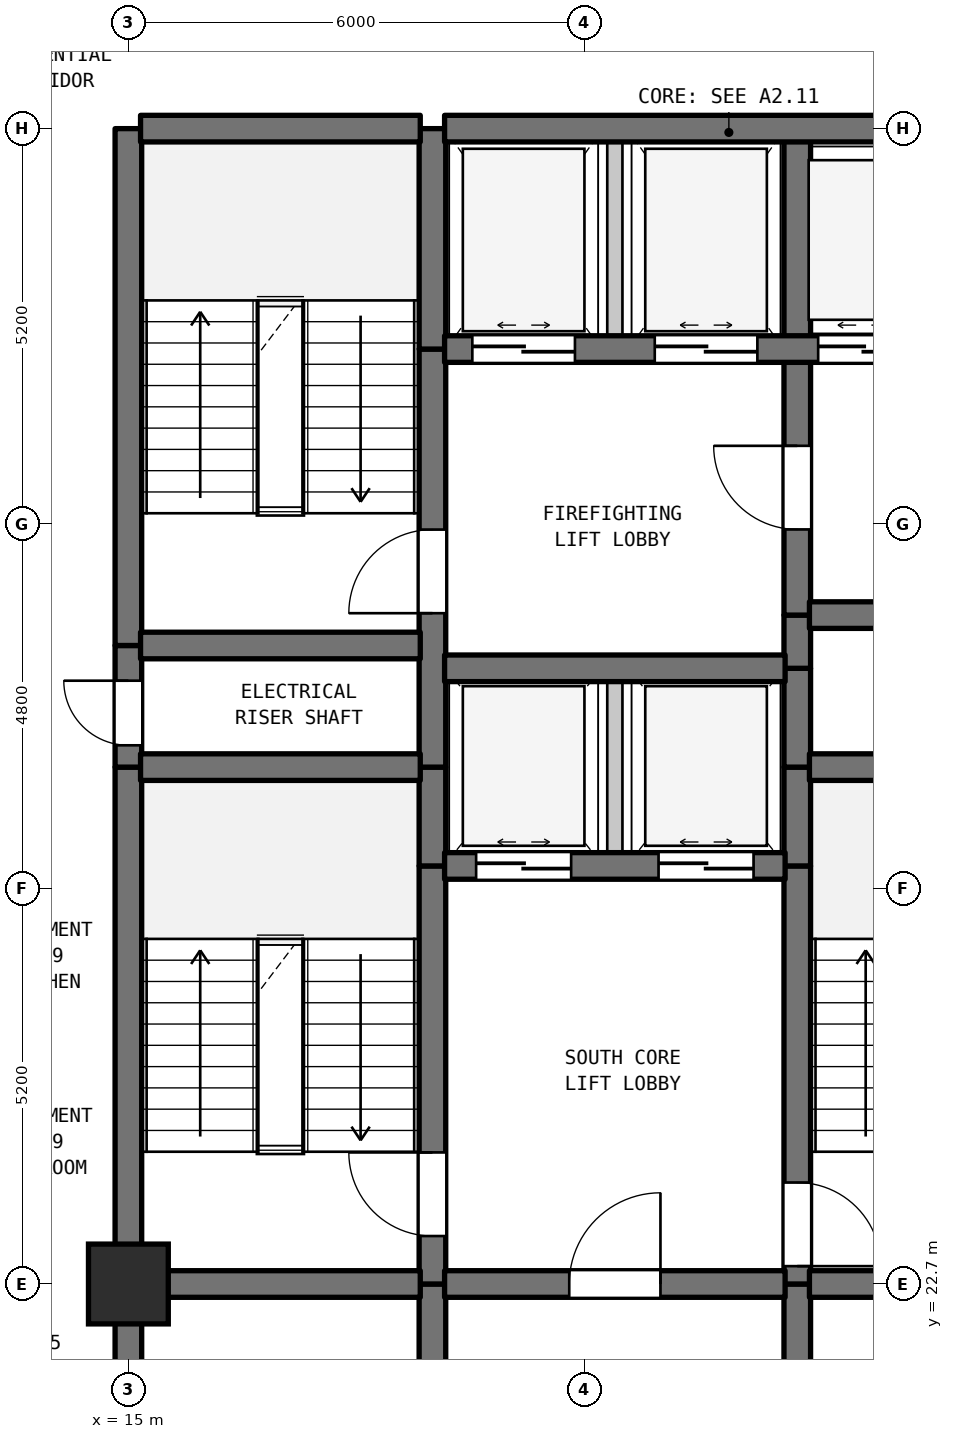
"""IFC4 building model, lengths in metres.
Left out: names, types, materials, properties, quantities, classifications, styles, units other than length and angle.
Written with IfcOpenShell. Run it as: python <this file> out.ifc"""

import sys

from ifc_helpers import new_model, si_unit, direction, frame, frame_2d, origin, origin_2d, place, context, subcontext, project, spatial, rectangle, extrude, element, fill, save


model = new_model("IFC4")
c1 = context("Model", 3, precision=1e-05, world=origin(), true_north=direction((0.0, 1.0)))
c2 = subcontext(c1, "Body", "Model", "MODEL_VIEW")
j1 = project(units=[si_unit("LENGTHUNIT", "METRE"), si_unit("PLANEANGLEUNIT", "RADIAN")], contexts=[c1])
p1 = place(None, origin())
s1 = spatial("IfcSite", under=j1, at=p1, CompositionType="ELEMENT")
p2 = place(p1, origin())
s2 = spatial("IfcBuilding", under=s1, at=p2, CompositionType="ELEMENT")
p3 = place(p2, frame((0.0, 0.0, 94.6)))
s3 = spatial("IfcBuildingStorey", under=s2, at=p3, CompositionType="ELEMENT", Elevation=94.6)
p4 = place(p3, frame((15.0, 22.7, 0.0), z_axis=(0.0, 0.0, 1.0), x_axis=(1.0, 0.0, 0.0)))
e1 = element("IfcColumn", 1, at=p4, inside=s3, PredefinedType="COLUMN", context=c2, shape_type="SweptSolid", body=[
    extrude(rectangle(XDim=1.05, YDim=1.05, at=origin_2d()), origin(), (0.0, 0.0, 1.0), 3.7),
])
p5 = place(p3, frame((15.0, 19.5, 0.0), z_axis=(0.0, 0.0, 1.0), x_axis=(0.0, 1.0, 0.0)))
e2 = element("IfcWall", 2, at=p5, inside=s3, PredefinedType="SHEAR", context=c2, shape_type="SweptSolid", body=[
    extrude(rectangle(XDim=3.2, YDim=0.35, at=frame_2d((1.6, 0.0))), origin(), (0.0, 0.0, 1.0), 3.385),
])
p6 = place(p3, frame((15.0, 22.7, 0.0), z_axis=(0.0, 0.0, 1.0), x_axis=(0.0, 1.0, 0.0)))
e3 = element("IfcWall", 3, at=p6, inside=s3, PredefinedType="SHEAR", context=c2, shape_type="SweptSolid", body=[
    extrude(rectangle(XDim=6.8, YDim=0.35, at=frame_2d((3.4, 0.0))), origin(), (0.0, 0.0, 1.0), 3.385),
])
p7 = place(p3, frame((15.0, 29.5, 0.0), z_axis=(0.0, 0.0, 1.0), x_axis=(0.0, 1.0, 0.0)))
e4 = element("IfcWall", 4, at=p7, inside=s3, PredefinedType="SHEAR", context=c2, shape_type="SweptSolid", body=[
    extrude(rectangle(XDim=1.6, YDim=0.35, at=frame_2d((0.8, 0.0))), origin(), (0.0, 0.0, 1.0), 3.385),
])
p8 = place(p7, frame((0.287, 0.0, 0.0)))
e5 = element("IfcOpeningElement", 5, at=p8, cuts=e4, PredefinedType="OPENING", context=c2, shape_type="SweptSolid", body=[
    extrude(rectangle(XDim=0.85, YDim=2.1, at=frame_2d((0.425, 1.05))), frame((0.0, 0.185, 0.0), z_axis=(0.0, -1.0, 0.0), x_axis=(1.0, 0.0, 0.0)), (0.0, 0.0, 1.0), 0.37),
])
p9 = place(p3, frame((15.0, 31.1, 0.0), z_axis=(0.0, 0.0, 1.0), x_axis=(0.0, 1.0, 0.0)))
e6 = element("IfcWall", 6, at=p9, inside=s3, PredefinedType="SHEAR", context=c2, shape_type="SweptSolid", body=[
    extrude(rectangle(XDim=6.8, YDim=0.35, at=frame_2d((3.4, 0.0))), origin(), (0.0, 0.0, 1.0), 3.385),
])
p10 = place(p3, frame((19.0, 19.5, 0.0), z_axis=(0.0, 0.0, 1.0), x_axis=(0.0, 1.0, 0.0)))
e7 = element("IfcWall", 7, at=p10, inside=s3, PredefinedType="SHEAR", context=c2, shape_type="SweptSolid", body=[
    extrude(rectangle(XDim=3.2, YDim=0.35, at=frame_2d((1.6, 0.0))), origin(), (0.0, 0.0, 1.0), 3.385),
])
p11 = place(p3, frame((19.0, 22.7, 0.0), z_axis=(0.0, 0.0, 1.0), x_axis=(0.0, 1.0, 0.0)))
e8 = element("IfcWall", 8, at=p11, inside=s3, PredefinedType="SHEAR", context=c2, shape_type="SweptSolid", body=[
    extrude(rectangle(XDim=5.5, YDim=0.35, at=frame_2d((2.75, 0.0))), origin(), (0.0, 0.0, 1.0), 3.385),
])
p12 = place(p11, frame((0.631, 0.0, 0.0)))
e9 = element("IfcOpeningElement", 9, at=p12, cuts=e8, PredefinedType="OPENING", context=c2, shape_type="SweptSolid", body=[
    extrude(rectangle(XDim=1.1, YDim=2.15, at=frame_2d((0.55, 1.075))), frame((0.0, 0.185, 0.0), z_axis=(0.0, -1.0, 0.0), x_axis=(1.0, 0.0, 0.0)), (0.0, 0.0, 1.0), 0.37),
])
p13 = place(p3, frame((19.0, 28.2, 0.0), z_axis=(0.0, 0.0, 1.0), x_axis=(0.0, 1.0, 0.0)))
e10 = element("IfcWall", 10, at=p13, inside=s3, PredefinedType="SHEAR", context=c2, shape_type="SweptSolid", body=[
    extrude(rectangle(XDim=1.3, YDim=0.35, at=frame_2d((0.65, 0.0))), origin(), (0.0, 0.0, 1.0), 3.385),
])
p14 = place(p3, frame((19.0, 29.5, 0.0), z_axis=(0.0, 0.0, 1.0), x_axis=(0.0, 1.0, 0.0)))
e11 = element("IfcWall", 11, at=p14, inside=s3, PredefinedType="SHEAR", context=c2, shape_type="SweptSolid", body=[
    extrude(rectangle(XDim=5.5, YDim=0.35, at=frame_2d((2.75, 0.0))), origin(), (0.0, 0.0, 1.0), 3.385),
])
p15 = place(p14, frame((2.025, 0.0, 0.0)))
e12 = element("IfcOpeningElement", 12, at=p15, cuts=e11, PredefinedType="OPENING", context=c2, shape_type="SweptSolid", body=[
    extrude(rectangle(XDim=1.1, YDim=2.15, at=frame_2d((0.55, 1.075))), frame((0.0, 0.185, 0.0), z_axis=(0.0, -1.0, 0.0), x_axis=(1.0, 0.0, 0.0)), (0.0, 0.0, 1.0), 0.37),
])
p16 = place(p3, frame((19.0, 35.0, 0.0), z_axis=(0.0, 0.0, 1.0), x_axis=(0.0, 1.0, 0.0)))
e13 = element("IfcWall", 13, at=p16, inside=s3, PredefinedType="SHEAR", context=c2, shape_type="SweptSolid", body=[
    extrude(rectangle(XDim=2.9, YDim=0.35, at=frame_2d((1.45, 0.0))), origin(), (0.0, 0.0, 1.0), 3.385),
])
p17 = place(p3, frame((21.4, 28.2, 0.0), z_axis=(0.0, 0.0, 1.0), x_axis=(0.0, 1.0, 0.0)))
e14 = element("IfcWall", 14, at=p17, inside=s3, PredefinedType="STANDARD", context=c2, shape_type="SweptSolid", body=[
    extrude(rectangle(XDim=2.6, YDim=0.2, at=frame_2d((1.3, 0.0))), origin(), (0.0, 0.0, 1.0), 3.385),
])
p18 = place(p3, frame((21.4, 35.0, 0.0), z_axis=(0.0, 0.0, 1.0), x_axis=(0.0, 1.0, 0.0)))
e15 = element("IfcWall", 15, at=p18, inside=s3, PredefinedType="STANDARD", context=c2, shape_type="SweptSolid", body=[
    extrude(rectangle(XDim=2.9, YDim=0.2, at=frame_2d((1.45, 0.0))), origin(), (0.0, 0.0, 1.0), 3.385),
])
p19 = place(p3, frame((23.8, 19.5, 0.0), z_axis=(0.0, 0.0, 1.0), x_axis=(0.0, 1.0, 0.0)))
e16 = element("IfcWall", 16, at=p19, inside=s3, PredefinedType="SHEAR", context=c2, shape_type="SweptSolid", body=[
    extrude(rectangle(XDim=3.2, YDim=0.35, at=frame_2d((1.6, 0.0))), origin(), (0.0, 0.0, 1.0), 3.385),
])
p20 = place(p3, frame((23.8, 22.7, 0.0), z_axis=(0.0, 0.0, 1.0), x_axis=(0.0, 1.0, 0.0)))
e17 = element("IfcWall", 17, at=p20, inside=s3, PredefinedType="SHEAR", context=c2, shape_type="SweptSolid", body=[
    extrude(rectangle(XDim=5.5, YDim=0.35, at=frame_2d((2.75, 0.0))), origin(), (0.0, 0.0, 1.0), 3.385),
])
p21 = place(p20, frame((0.235, 0.0, 0.0)))
e18 = element("IfcOpeningElement", 18, at=p21, cuts=e17, PredefinedType="OPENING", context=c2, shape_type="SweptSolid", body=[
    extrude(rectangle(XDim=1.1, YDim=2.15, at=frame_2d((0.55, 1.075))), frame((0.0, 0.185, 0.0), z_axis=(0.0, -1.0, 0.0), x_axis=(1.0, 0.0, 0.0)), (0.0, 0.0, 1.0), 0.37),
])
for number, where, z_axis, x_axis in (
    (19, (23.8, 28.2, 0.0), (0.0, 0.0, 1.0), (0.0, 1.0, 0.0)),
    (20, (23.8, 29.5, 0.0), (0.0, 0.0, 1.0), (0.0, 1.0, 0.0)),
):
    element("IfcWall", number, at=place(p3, frame(where, z_axis=z_axis, x_axis=x_axis)), inside=s3, PredefinedType="SHEAR", context=c2, shape_type="SweptSolid", body=[
        extrude(rectangle(XDim=1.3, YDim=0.35, at=frame_2d((0.65, 0.0))), origin(), (0.0, 0.0, 1.0), 3.385),
    ])
p22 = place(p3, frame((23.8, 30.8, 0.0), z_axis=(0.0, 0.0, 1.0), x_axis=(0.0, 1.0, 0.0)))
e21 = element("IfcWall", 21, at=p22, inside=s3, PredefinedType="SHEAR", context=c2, shape_type="SweptSolid", body=[
    extrude(rectangle(XDim=0.7, YDim=0.35, at=frame_2d((0.35, 0.0))), origin(), (0.0, 0.0, 1.0), 3.385),
])
p23 = place(p3, frame((23.8, 31.5, 0.0), z_axis=(0.0, 0.0, 1.0), x_axis=(0.0, 1.0, 0.0)))
e22 = element("IfcWall", 22, at=p23, inside=s3, PredefinedType="SHEAR", context=c2, shape_type="SweptSolid", body=[
    extrude(rectangle(XDim=3.5, YDim=0.35, at=frame_2d((1.75, 0.0))), origin(), (0.0, 0.0, 1.0), 3.385),
])
p24 = place(p23, frame((1.127, 0.0, 0.0)))
e23 = element("IfcOpeningElement", 23, at=p24, cuts=e22, PredefinedType="OPENING", context=c2, shape_type="SweptSolid", body=[
    extrude(rectangle(XDim=1.1, YDim=2.15, at=frame_2d((0.55, 1.075))), frame((0.0, 0.185, 0.0), z_axis=(0.0, -1.0, 0.0), x_axis=(1.0, 0.0, 0.0)), (0.0, 0.0, 1.0), 0.37),
])
p25 = place(p3, frame((23.8, 35.0, 0.0), z_axis=(0.0, 0.0, 1.0), x_axis=(0.0, 1.0, 0.0)))
e24 = element("IfcWall", 24, at=p25, inside=s3, PredefinedType="SHEAR", context=c2, shape_type="SweptSolid", body=[
    extrude(rectangle(XDim=2.9, YDim=0.35, at=frame_2d((1.45, 0.0))), origin(), (0.0, 0.0, 1.0), 3.385),
])
p26 = place(p3, frame((15.16, 22.7, 0.0), z_axis=(0.0, 0.0, 1.0), x_axis=(1.0, 0.0, 0.0)))
e25 = element("IfcWall", 25, at=p26, inside=s3, PredefinedType="SHEAR", context=c2, shape_type="SweptSolid", body=[
    extrude(rectangle(XDim=3.68, YDim=0.35, at=frame_2d((1.84, 0.0))), origin(), (0.0, 0.0, 1.0), 3.385),
])
p27 = place(p3, frame((19.16, 22.7, 0.0), z_axis=(0.0, 0.0, 1.0), x_axis=(1.0, 0.0, 0.0)))
e26 = element("IfcWall", 26, at=p27, inside=s3, PredefinedType="SHEAR", context=c2, shape_type="SweptSolid", body=[
    extrude(rectangle(XDim=4.48, YDim=0.35, at=frame_2d((2.24, 0.0))), origin(), (0.0, 0.0, 1.0), 3.385),
])
p28 = place(p27, frame((1.64, 0.0, 0.0)))
e27 = element("IfcOpeningElement", 27, at=p28, cuts=e26, PredefinedType="OPENING", context=c2, shape_type="SweptSolid", body=[
    extrude(rectangle(XDim=1.2, YDim=2.2, at=frame_2d((0.6, 1.1))), frame((0.0, 0.185, 0.0), z_axis=(0.0, -1.0, 0.0), x_axis=(1.0, 0.0, 0.0)), (0.0, 0.0, 1.0), 0.37),
])
p29 = place(p3, frame((23.96, 22.7, 0.0), z_axis=(0.0, 0.0, 1.0), x_axis=(1.0, 0.0, 0.0)))
e28 = element("IfcWall", 28, at=p29, inside=s3, PredefinedType="SHEAR", context=c2, shape_type="SweptSolid", body=[
    extrude(rectangle(XDim=3.18, YDim=0.35, at=frame_2d((1.59, 0.0))), origin(), (0.0, 0.0, 1.0), 3.385),
])
p30 = place(p3, frame((19.16, 28.2, 0.0), z_axis=(0.0, 0.0, 1.0), x_axis=(1.0, 0.0, 0.0)))
e29 = element("IfcWall", 29, at=p30, inside=s3, PredefinedType="SHEAR", context=c2, shape_type="SweptSolid", body=[
    extrude(rectangle(XDim=4.48, YDim=0.35, at=frame_2d((2.24, 0.0))), origin(), (0.0, 0.0, 1.0), 3.385),
])
p31 = place(p30, frame((0.415, 0.0, 0.0)))
e30 = element("IfcOpeningElement", 30, at=p31, cuts=e29, PredefinedType="OPENING", context=c2, shape_type="SweptSolid", body=[
    extrude(rectangle(XDim=1.25, YDim=2.2, at=frame_2d((0.625, 1.1))), frame((0.0, 0.185, 0.0), z_axis=(0.0, -1.0, 0.0), x_axis=(1.0, 0.0, 0.0)), (0.0, 0.0, 1.0), 0.37),
])
p32 = place(p30, frame((2.815, 0.0, 0.0)))
e31 = element("IfcOpeningElement", 31, at=p32, cuts=e29, PredefinedType="OPENING", context=c2, shape_type="SweptSolid", body=[
    extrude(rectangle(XDim=1.25, YDim=2.2, at=frame_2d((0.625, 1.1))), frame((0.0, 0.185, 0.0), z_axis=(0.0, -1.0, 0.0), x_axis=(1.0, 0.0, 0.0)), (0.0, 0.0, 1.0), 0.37),
])
p33 = place(p3, frame((15.16, 29.5, 0.0), z_axis=(0.0, 0.0, 1.0), x_axis=(1.0, 0.0, 0.0)))
e32 = element("IfcWall", 32, at=p33, inside=s3, PredefinedType="SHEAR", context=c2, shape_type="SweptSolid", body=[
    extrude(rectangle(XDim=3.68, YDim=0.35, at=frame_2d((1.84, 0.0))), origin(), (0.0, 0.0, 1.0), 3.385),
])
p34 = place(p3, frame((23.96, 29.5, 0.0), z_axis=(0.0, 0.0, 1.0), x_axis=(1.0, 0.0, 0.0)))
e33 = element("IfcWall", 33, at=p34, inside=s3, PredefinedType="SHEAR", context=c2, shape_type="SweptSolid", body=[
    extrude(rectangle(XDim=3.18, YDim=0.35, at=frame_2d((1.59, 0.0))), origin(), (0.0, 0.0, 1.0), 3.385),
])
p35 = place(p3, frame((19.16, 30.8, 0.0), z_axis=(0.0, 0.0, 1.0), x_axis=(1.0, 0.0, 0.0)))
e34 = element("IfcWall", 34, at=p35, inside=s3, PredefinedType="SHEAR", context=c2, shape_type="SweptSolid", body=[
    extrude(rectangle(XDim=4.48, YDim=0.35, at=frame_2d((2.24, 0.0))), origin(), (0.0, 0.0, 1.0), 3.385),
])
p36 = place(p3, frame((15.16, 31.1, 0.0), z_axis=(0.0, 0.0, 1.0), x_axis=(1.0, 0.0, 0.0)))
e35 = element("IfcWall", 35, at=p36, inside=s3, PredefinedType="SHEAR", context=c2, shape_type="SweptSolid", body=[
    extrude(rectangle(XDim=3.68, YDim=0.35, at=frame_2d((1.84, 0.0))), origin(), (0.0, 0.0, 1.0), 3.385),
])
p37 = place(p3, frame((23.96, 31.5, 0.0), z_axis=(0.0, 0.0, 1.0), x_axis=(1.0, 0.0, 0.0)))
e36 = element("IfcWall", 36, at=p37, inside=s3, PredefinedType="SHEAR", context=c2, shape_type="SweptSolid", body=[
    extrude(rectangle(XDim=3.18, YDim=0.35, at=frame_2d((1.59, 0.0))), origin(), (0.0, 0.0, 1.0), 3.385),
])
p38 = place(p37, frame((1.094, 0.0, 0.0)))
e37 = element("IfcOpeningElement", 37, at=p38, cuts=e36, PredefinedType="OPENING", context=c2, shape_type="SweptSolid", body=[
    extrude(rectangle(XDim=0.85, YDim=2.1, at=frame_2d((0.425, 1.05))), frame((0.0, 0.185, 0.0), z_axis=(0.0, -1.0, 0.0), x_axis=(1.0, 0.0, 0.0)), (0.0, 0.0, 1.0), 0.37),
])
p39 = place(p3, frame((19.16, 35.0, 0.0), z_axis=(0.0, 0.0, 1.0), x_axis=(1.0, 0.0, 0.0)))
e38 = element("IfcWall", 38, at=p39, inside=s3, PredefinedType="SHEAR", context=c2, shape_type="SweptSolid", body=[
    extrude(rectangle(XDim=11.48, YDim=0.35, at=frame_2d((5.74, 0.0))), origin(), (0.0, 0.0, 1.0), 3.385),
])
p40 = place(p39, frame((0.365, 0.0, 0.0)))
e39 = element("IfcOpeningElement", 39, at=p40, cuts=e38, PredefinedType="OPENING", context=c2, shape_type="SweptSolid", body=[
    extrude(rectangle(XDim=1.35, YDim=2.2, at=frame_2d((0.675, 1.1))), frame((0.0, 0.185, 0.0), z_axis=(0.0, -1.0, 0.0), x_axis=(1.0, 0.0, 0.0)), (0.0, 0.0, 1.0), 0.37),
])
p41 = place(p39, frame((2.765, 0.0, 0.0)))
e40 = element("IfcOpeningElement", 40, at=p41, cuts=e38, PredefinedType="OPENING", context=c2, shape_type="SweptSolid", body=[
    extrude(rectangle(XDim=1.35, YDim=2.2, at=frame_2d((0.675, 1.1))), frame((0.0, 0.185, 0.0), z_axis=(0.0, -1.0, 0.0), x_axis=(1.0, 0.0, 0.0)), (0.0, 0.0, 1.0), 0.37),
])
p42 = place(p39, frame((4.915, 0.0, 0.0)))
e41 = element("IfcOpeningElement", 41, at=p42, cuts=e38, PredefinedType="OPENING", context=c2, shape_type="SweptSolid", body=[
    extrude(rectangle(XDim=1.2, YDim=2.2, at=frame_2d((0.6, 1.1))), frame((0.0, 0.185, 0.0), z_axis=(0.0, -1.0, 0.0), x_axis=(1.0, 0.0, 0.0)), (0.0, 0.0, 1.0), 0.37),
])
p43 = place(p39, frame((6.665, 0.0, 0.0)))
e42 = element("IfcOpeningElement", 42, at=p43, cuts=e38, PredefinedType="OPENING", context=c2, shape_type="SweptSolid", body=[
    extrude(rectangle(XDim=1.2, YDim=2.2, at=frame_2d((0.6, 1.1))), frame((0.0, 0.185, 0.0), z_axis=(0.0, -1.0, 0.0), x_axis=(1.0, 0.0, 0.0)), (0.0, 0.0, 1.0), 0.37),
])
p44 = place(p39, frame((8.415, 0.0, 0.0)))
e43 = element("IfcOpeningElement", 43, at=p44, cuts=e38, PredefinedType="OPENING", context=c2, shape_type="SweptSolid", body=[
    extrude(rectangle(XDim=1.2, YDim=2.2, at=frame_2d((0.6, 1.1))), frame((0.0, 0.185, 0.0), z_axis=(0.0, -1.0, 0.0), x_axis=(1.0, 0.0, 0.0)), (0.0, 0.0, 1.0), 0.37),
])
p45 = place(p39, frame((10.16, 0.0, 0.0)))
e44 = element("IfcOpeningElement", 44, at=p45, cuts=e38, PredefinedType="OPENING", context=c2, shape_type="SweptSolid", body=[
    extrude(rectangle(XDim=1.2, YDim=2.2, at=frame_2d((0.6, 1.1))), frame((0.0, 0.185, 0.0), z_axis=(0.0, -1.0, 0.0), x_axis=(1.0, 0.0, 0.0)), (0.0, 0.0, 1.0), 0.37),
])
p46 = place(p3, frame((15.16, 37.9, 0.0), z_axis=(0.0, 0.0, 1.0), x_axis=(1.0, 0.0, 0.0)))
e45 = element("IfcWall", 45, at=p46, inside=s3, PredefinedType="SHEAR", context=c2, shape_type="SweptSolid", body=[
    extrude(rectangle(XDim=3.68, YDim=0.35, at=frame_2d((1.84, 0.0))), origin(), (0.0, 0.0, 1.0), 3.385),
])
p47 = place(p3, frame((19.16, 37.9, 0.0), z_axis=(0.0, 0.0, 1.0), x_axis=(1.0, 0.0, 0.0)))
e46 = element("IfcWall", 46, at=p47, inside=s3, PredefinedType="SHEAR", context=c2, shape_type="SweptSolid", body=[
    extrude(rectangle(XDim=11.48, YDim=0.35, at=frame_2d((5.74, 0.0))), origin(), (0.0, 0.0, 1.0), 3.385),
])
p48 = place(p8, origin())
e47 = element("IfcDoor", 47, at=p48, inside=s3, OperationType="SINGLE_SWING_RIGHT", PredefinedType="DOOR", context=c2, shape_type="SweptSolid", body=[
    extrude(rectangle(XDim=0.85, YDim=2.1, at=frame_2d((0.425, 1.05))), frame((0.0, 0.025, 0.0), z_axis=(0.0, -1.0, 0.0), x_axis=(1.0, 0.0, 0.0)), (0.0, 0.0, 1.0), 0.05),
])
fill(e5, e47)
p49 = place(p12, origin())
e48 = element("IfcDoor", 48, at=p49, inside=s3, OperationType="SINGLE_SWING_RIGHT", PredefinedType="DOOR", context=c2, shape_type="SweptSolid", body=[
    extrude(rectangle(XDim=1.1, YDim=2.15, at=frame_2d((0.55, 1.075))), frame((0.0, 0.025, 0.0), z_axis=(0.0, -1.0, 0.0), x_axis=(1.0, 0.0, 0.0)), (0.0, 0.0, 1.0), 0.05),
])
fill(e9, e48)
p50 = place(p15, origin())
e49 = element("IfcDoor", 49, at=p50, inside=s3, OperationType="SINGLE_SWING_LEFT", PredefinedType="DOOR", context=c2, shape_type="SweptSolid", body=[
    extrude(rectangle(XDim=1.1, YDim=2.15, at=frame_2d((0.55, 1.075))), frame((0.0, 0.025, 0.0), z_axis=(0.0, -1.0, 0.0), x_axis=(1.0, 0.0, 0.0)), (0.0, 0.0, 1.0), 0.05),
])
fill(e12, e49)
p51 = place(p21, frame((1.1, 0.0, 0.0), z_axis=(0.0, 0.0, 1.0), x_axis=(-1.0, 0.0, 0.0)))
e50 = element("IfcDoor", 50, at=p51, inside=s3, OperationType="SINGLE_SWING_LEFT", PredefinedType="DOOR", context=c2, shape_type="SweptSolid", body=[
    extrude(rectangle(XDim=1.1, YDim=2.15, at=frame_2d((0.55, 1.075))), frame((0.0, 0.025, 0.0), z_axis=(0.0, -1.0, 0.0), x_axis=(1.0, 0.0, 0.0)), (0.0, 0.0, 1.0), 0.05),
])
fill(e18, e50)
p52 = place(p24, origin())
e51 = element("IfcDoor", 51, at=p52, inside=s3, OperationType="SINGLE_SWING_RIGHT", PredefinedType="DOOR", context=c2, shape_type="SweptSolid", body=[
    extrude(rectangle(XDim=1.1, YDim=2.15, at=frame_2d((0.55, 1.075))), frame((0.0, 0.025, 0.0), z_axis=(0.0, -1.0, 0.0), x_axis=(1.0, 0.0, 0.0)), (0.0, 0.0, 1.0), 0.05),
])
fill(e23, e51)
p53 = place(p28, origin())
e52 = element("IfcDoor", 52, at=p53, inside=s3, OperationType="SINGLE_SWING_RIGHT", PredefinedType="DOOR", context=c2, shape_type="SweptSolid", body=[
    extrude(rectangle(XDim=1.2, YDim=2.2, at=frame_2d((0.6, 1.1))), frame((0.0, 0.025, 0.0), z_axis=(0.0, -1.0, 0.0), x_axis=(1.0, 0.0, 0.0)), (0.0, 0.0, 1.0), 0.05),
])
fill(e27, e52)
p54 = place(p31, origin())
e53 = element("IfcDoor", 53, at=p54, inside=s3, OperationType="DOUBLE_DOOR_SLIDING", PredefinedType="DOOR", context=c2, shape_type="SweptSolid", body=[
    extrude(rectangle(XDim=1.25, YDim=2.2, at=frame_2d((0.625, 1.1))), frame((0.0, 0.025, 0.0), z_axis=(0.0, -1.0, 0.0), x_axis=(1.0, 0.0, 0.0)), (0.0, 0.0, 1.0), 0.05),
])
fill(e30, e53)
p55 = place(p32, origin())
e54 = element("IfcDoor", 54, at=p55, inside=s3, OperationType="DOUBLE_DOOR_SLIDING", PredefinedType="DOOR", context=c2, shape_type="SweptSolid", body=[
    extrude(rectangle(XDim=1.25, YDim=2.2, at=frame_2d((0.625, 1.1))), frame((0.0, 0.025, 0.0), z_axis=(0.0, -1.0, 0.0), x_axis=(1.0, 0.0, 0.0)), (0.0, 0.0, 1.0), 0.05),
])
fill(e31, e54)
p56 = place(p40, origin())
e55 = element("IfcDoor", 55, at=p56, inside=s3, OperationType="DOUBLE_DOOR_SLIDING", PredefinedType="DOOR", context=c2, shape_type="SweptSolid", body=[
    extrude(rectangle(XDim=1.35, YDim=2.2, at=frame_2d((0.675, 1.1))), frame((0.0, 0.025, 0.0), z_axis=(0.0, -1.0, 0.0), x_axis=(1.0, 0.0, 0.0)), (0.0, 0.0, 1.0), 0.05),
])
fill(e39, e55)
p57 = place(p41, origin())
e56 = element("IfcDoor", 56, at=p57, inside=s3, OperationType="DOUBLE_DOOR_SLIDING", PredefinedType="DOOR", context=c2, shape_type="SweptSolid", body=[
    extrude(rectangle(XDim=1.35, YDim=2.2, at=frame_2d((0.675, 1.1))), frame((0.0, 0.025, 0.0), z_axis=(0.0, -1.0, 0.0), x_axis=(1.0, 0.0, 0.0)), (0.0, 0.0, 1.0), 0.05),
])
fill(e40, e56)
p58 = place(p42, origin())
e57 = element("IfcDoor", 57, at=p58, inside=s3, OperationType="DOUBLE_DOOR_SLIDING", PredefinedType="DOOR", context=c2, shape_type="SweptSolid", body=[
    extrude(rectangle(XDim=1.2, YDim=2.2, at=frame_2d((0.6, 1.1))), frame((0.0, 0.025, 0.0), z_axis=(0.0, -1.0, 0.0), x_axis=(1.0, 0.0, 0.0)), (0.0, 0.0, 1.0), 0.05),
])
fill(e41, e57)
save(model, sys.argv[1])
